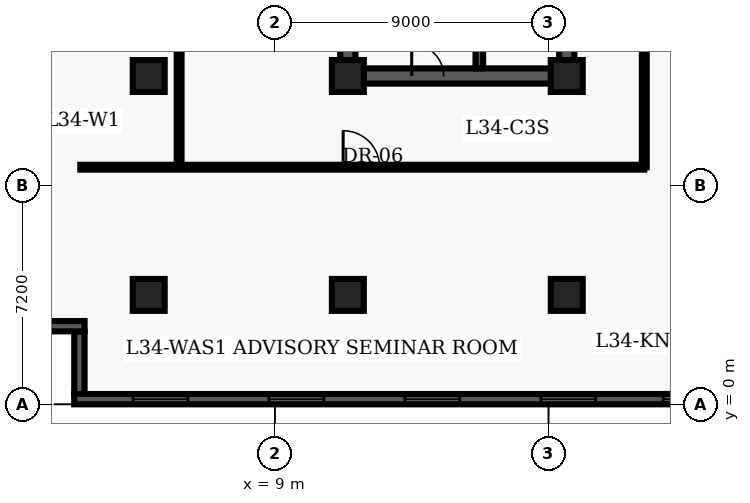
"""IFC4 building model, lengths in metres.
Left out: names, types, materials, properties, quantities, classifications, styles, units other than length and angle.
Written with IfcOpenShell. Run it as: python <this file> out.ifc"""

import sys

from ifc_helpers import new_model, entity, si_unit, converted_unit, direction, frame, origin_with_axes, origin_2d_with_axis, place, context, subcontext, project, spatial, polyline, rectangle, outline, extrude, element, fill, save


model = new_model("IFC4")
c1 = context("Model", 3, precision=1e-05, world=origin_with_axes(), true_north=direction((0.0, 1.0)))
c2 = subcontext(c1, "Body", "Model", "MODEL_VIEW")
j1 = project(units=[si_unit("LENGTHUNIT", "METRE"), converted_unit("PLANEANGLEUNIT", "DEGREE", entity("IfcPlaneAngleMeasure", 0.017), si_unit("PLANEANGLEUNIT", "RADIAN"), dimensions=[0, 0, 0, 0, 0, 0, 0])], contexts=[c1])
p1 = place(None, origin_with_axes())
s1 = spatial("IfcSite", under=j1, at=p1, CompositionType="ELEMENT")
p2 = place(p1, origin_with_axes())
s2 = spatial("IfcBuilding", under=s1, at=p2, CompositionType="ELEMENT")
p3 = place(p2, frame((0.0, 0.0, 140.7), z_axis=(0.0, 0.0, 1.0), x_axis=(1.0, 0.0, 0.0)))
s3 = spatial("IfcBuildingStorey", under=s2, at=p3, CompositionType="ELEMENT", Elevation=140.7)
p4 = place(p3, frame((11.4, 10.8, 0.0), z_axis=(0.0, 0.0, 1.0), x_axis=(0.0, 1.0, 0.0)))
e1 = element("IfcWall", 1, at=p4, inside=s3, PredefinedType="SHEAR", context=c2, shape_type="SweptSolid", body=[
    extrude(outline(polyline([(0.0, -0.25), (27.0, -0.25), (27.0, 0.25), (0.0, 0.25), (0.0, -0.25)])), origin_with_axes(), (0.0, 0.0, 1.0), 3.66),
])
p5 = place(p3, frame((11.4, 10.8, 0.0), z_axis=(0.0, 0.0, 1.0), x_axis=(1.0, 0.0, 0.0)))
e2 = element("IfcWall", 2, at=p5, inside=s3, PredefinedType="SHEAR", context=c2, shape_type="SweptSolid", body=[
    extrude(outline(polyline([(0.0, -0.25), (7.2, -0.25), (7.2, 0.25), (0.0, 0.25), (0.0, -0.25)])), origin_with_axes(), (0.0, 0.0, 1.0), 3.66),
])
p6 = place(p5, frame((2.625, 0.0, 0.0), z_axis=(0.0, 0.0, 1.0), x_axis=(1.0, 0.0, 0.0)))
e3 = element("IfcOpeningElement", 3, at=p6, cuts=e2, PredefinedType="OPENING", context=c2, shape_type="SweptSolid", body=[
    extrude(rectangle(XDim=1.05, YDim=0.52, at=origin_2d_with_axis()), origin_with_axes(), (0.0, 0.0, 1.0), 2.15),
])
p7 = place(p3, frame((18.6, 10.8, 0.0), z_axis=(0.0, 0.0, 1.0), x_axis=(0.0, 1.0, 0.0)))
e4 = element("IfcWall", 4, at=p7, inside=s3, PredefinedType="SHEAR", context=c2, shape_type="SweptSolid", body=[
    extrude(outline(polyline([(0.0, -0.25), (13.5, -0.25), (13.5, 0.25), (0.0, 0.25), (0.0, -0.25)])), origin_with_axes(), (0.0, 0.0, 1.0), 3.66),
])
p8 = place(p7, frame((11.125, 0.0, 0.0), z_axis=(0.0, 0.0, 1.0), x_axis=(1.0, 0.0, 0.0)))
e5 = element("IfcOpeningElement", 5, at=p8, cuts=e4, PredefinedType="OPENING", context=c2, shape_type="SweptSolid", body=[
    extrude(rectangle(XDim=1.05, YDim=0.52, at=origin_2d_with_axis()), origin_with_axes(), (0.0, 0.0, 1.0), 2.15),
])
p9 = place(p7, frame((2.425, 0.0, 0.0), z_axis=(0.0, 0.0, 1.0), x_axis=(1.0, 0.0, 0.0)))
e6 = element("IfcOpeningElement", 6, at=p9, cuts=e4, PredefinedType="OPENING", context=c2, shape_type="SweptSolid", body=[
    extrude(rectangle(XDim=1.05, YDim=0.52, at=origin_2d_with_axis()), origin_with_axes(), (0.0, 0.0, 1.0), 2.15),
])
p10 = place(p7, frame((6.725, 0.0, 0.0), z_axis=(0.0, 0.0, 1.0), x_axis=(1.0, 0.0, 0.0)))
e7 = element("IfcOpeningElement", 7, at=p10, cuts=e4, PredefinedType="OPENING", context=c2, shape_type="SweptSolid", body=[
    extrude(rectangle(XDim=1.05, YDim=0.52, at=origin_2d_with_axis()), origin_with_axes(), (0.0, 0.0, 1.0), 2.15),
])
p11 = place(p3, frame((15.725, 11.05, 0.0), z_axis=(0.0, 0.0, 1.0), x_axis=(0.0, 1.0, 0.0)))
e8 = element("IfcWall", 8, at=p11, inside=s3, PredefinedType="SHEAR", context=c2, shape_type="SweptSolid", body=[
    extrude(outline(polyline([(0.0, -0.125), (8.65, -0.125), (8.65, 0.125), (0.0, 0.125), (0.0, -0.125)])), origin_with_axes(), (0.0, 0.0, 1.0), 3.66),
])
for number, where, z_axis, x_axis in (
    (9, (11.4, 3.6, 0.0), (0.0, 0.0, 1.0), (1.0, 0.0, 0.0)),
    (10, (11.4, 10.8, 0.0), (0.0, 0.0, 1.0), (1.0, 0.0, 0.0)),
    (11, (18.6, 3.6, 0.0), (0.0, 0.0, 1.0), (1.0, 0.0, 0.0)),
    (12, (18.6, 10.8, 0.0), (0.0, 0.0, 1.0), (1.0, 0.0, 0.0)),
    (13, (4.85, 3.6, 0.0), (0.0, 0.0, 1.0), (1.0, 0.0, 0.0)),
    (14, (4.85, 10.8, 0.0), (0.0, 0.0, 1.0), (1.0, 0.0, 0.0)),
):
    element("IfcColumn", number, at=place(p3, frame(where, z_axis=z_axis, x_axis=x_axis)), inside=s3, PredefinedType="COLUMN", context=c2, shape_type="SweptSolid", body=[
        extrude(rectangle(XDim=1.05, YDim=1.05, at=origin_2d_with_axis()), origin_with_axes(), (0.0, 0.0, 1.0), 3.9),
    ])
p12 = place(p3, frame((2.6, 7.8, 0.0), z_axis=(0.0, 0.0, 1.0), x_axis=(1.0, 0.0, 0.0)))
e15 = element("IfcWall", 15, at=p12, inside=s3, PredefinedType="PARTITIONING", context=c2, shape_type="SweptSolid", body=[
    extrude(outline(polyline([(0.0, -0.08), (18.55, -0.08), (18.55, 0.08), (0.0, 0.08), (0.0, -0.08)])), origin_with_axes(), (0.0, 0.0, 1.0), 2.7),
])
p13 = place(p12, frame((9.245, 0.0, 0.0), z_axis=(0.0, 0.0, 1.0), x_axis=(1.0, 0.0, 0.0)))
e16 = element("IfcOpeningElement", 16, at=p13, cuts=e15, PredefinedType="OPENING", context=c2, shape_type="SweptSolid", body=[
    extrude(rectangle(XDim=1.2, YDim=0.18, at=origin_2d_with_axis()), origin_with_axes(), (0.0, 0.0, 1.0), 2.2),
])
p14 = place(p3, frame((21.15, 7.8, 0.0), z_axis=(0.0, 0.0, 1.0), x_axis=(0.0, 1.0, 0.0)))
e17 = element("IfcWall", 17, at=p14, inside=s3, PredefinedType="PARTITIONING", context=c2, shape_type="SweptSolid", body=[
    extrude(outline(polyline([(0.0, -0.08), (32.7, -0.08), (32.7, 0.08), (0.0, 0.08), (0.0, -0.08)])), origin_with_axes(), (0.0, 0.0, 1.0), 2.7),
])
p15 = place(p14, frame((5.475, 0.0, 0.0), z_axis=(0.0, 0.0, 1.0), x_axis=(1.0, 0.0, 0.0)))
e18 = element("IfcOpeningElement", 18, at=p15, cuts=e17, PredefinedType="OPENING", context=c2, shape_type="SweptSolid", body=[
    extrude(rectangle(XDim=1.05, YDim=0.18, at=origin_2d_with_axis()), origin_with_axes(), (0.0, 0.0, 1.0), 2.15),
])
p16 = place(p3, frame((5.85, 7.8, 0.0), z_axis=(0.0, 0.0, 1.0), x_axis=(0.0, 1.0, 0.0)))
e19 = element("IfcWall", 19, at=p16, inside=s3, PredefinedType="PARTITIONING", context=c2, shape_type="SweptSolid", body=[
    extrude(outline(polyline([(0.0, -0.08), (32.7, -0.08), (32.7, 0.08), (0.0, 0.08), (0.0, -0.08)])), origin_with_axes(), (0.0, 0.0, 1.0), 2.7),
])
p17 = place(p16, frame((7.056, 0.0, 0.0), z_axis=(0.0, 0.0, 1.0), x_axis=(1.0, 0.0, 0.0)))
e20 = element("IfcOpeningElement", 20, at=p17, cuts=e19, PredefinedType="OPENING", context=c2, shape_type="SweptSolid", body=[
    extrude(rectangle(XDim=1.0, YDim=0.18, at=origin_2d_with_axis()), origin_with_axes(), (0.0, 0.0, 1.0), 2.15),
])
p18 = place(p16, frame((23.276, 0.0, 0.0), z_axis=(0.0, 0.0, 1.0), x_axis=(1.0, 0.0, 0.0)))
e21 = element("IfcOpeningElement", 21, at=p18, cuts=e19, PredefinedType="OPENING", context=c2, shape_type="SweptSolid", body=[
    extrude(rectangle(XDim=1.0, YDim=0.18, at=origin_2d_with_axis()), origin_with_axes(), (0.0, 0.0, 1.0), 2.15),
])
p19 = place(p3, frame((57.26, 0.17, 0.0), z_axis=(0.0, 0.0, 1.0), x_axis=(-1.0, 0.0, 0.0)))
e22 = element("IfcWall", 22, at=p19, inside=s3, PredefinedType="SOLIDWALL", context=c2, shape_type="SweptSolid", body=[
    extrude(outline(polyline([(0.0, -0.17), (54.86, -0.17), (54.86, 0.17), (0.0, 0.17), (0.0, -0.17)])), origin_with_axes(), (0.0, 0.0, 1.0), 3.66),
])
p20 = place(p19, frame((2.836, 0.0, 0.45), z_axis=(0.0, 0.0, 1.0), x_axis=(1.0, 0.0, 0.0)))
e23 = element("IfcOpeningElement", 23, at=p20, cuts=e22, PredefinedType="OPENING", context=c2, shape_type="SweptSolid", body=[
    extrude(rectangle(XDim=1.8, YDim=0.36, at=origin_2d_with_axis()), origin_with_axes(), (0.0, 0.0, 1.0), 2.1),
])
p21 = place(p19, frame((7.307, 0.0, 0.45), z_axis=(0.0, 0.0, 1.0), x_axis=(1.0, 0.0, 0.0)))
e24 = element("IfcOpeningElement", 24, at=p21, cuts=e22, PredefinedType="OPENING", context=c2, shape_type="SweptSolid", body=[
    extrude(rectangle(XDim=1.8, YDim=0.36, at=origin_2d_with_axis()), origin_with_axes(), (0.0, 0.0, 1.0), 2.1),
])
p22 = place(p19, frame((11.779, 0.0, 0.45), z_axis=(0.0, 0.0, 1.0), x_axis=(1.0, 0.0, 0.0)))
e25 = element("IfcOpeningElement", 25, at=p22, cuts=e22, PredefinedType="OPENING", context=c2, shape_type="SweptSolid", body=[
    extrude(rectangle(XDim=1.8, YDim=0.36, at=origin_2d_with_axis()), origin_with_axes(), (0.0, 0.0, 1.0), 2.1),
])
p23 = place(p19, frame((16.251, 0.0, 0.45), z_axis=(0.0, 0.0, 1.0), x_axis=(1.0, 0.0, 0.0)))
e26 = element("IfcOpeningElement", 26, at=p23, cuts=e22, PredefinedType="OPENING", context=c2, shape_type="SweptSolid", body=[
    extrude(rectangle(XDim=1.8, YDim=0.36, at=origin_2d_with_axis()), origin_with_axes(), (0.0, 0.0, 1.0), 2.1),
])
p24 = place(p19, frame((20.723, 0.0, 0.45), z_axis=(0.0, 0.0, 1.0), x_axis=(1.0, 0.0, 0.0)))
e27 = element("IfcOpeningElement", 27, at=p24, cuts=e22, PredefinedType="OPENING", context=c2, shape_type="SweptSolid", body=[
    extrude(rectangle(XDim=1.8, YDim=0.36, at=origin_2d_with_axis()), origin_with_axes(), (0.0, 0.0, 1.0), 2.1),
])
p25 = place(p19, frame((34.588, 0.0, 0.45), z_axis=(0.0, 0.0, 1.0), x_axis=(1.0, 0.0, 0.0)))
e28 = element("IfcOpeningElement", 28, at=p25, cuts=e22, PredefinedType="OPENING", context=c2, shape_type="SweptSolid", body=[
    extrude(rectangle(XDim=1.8, YDim=0.36, at=origin_2d_with_axis()), origin_with_axes(), (0.0, 0.0, 1.0), 2.1),
])
p26 = place(p19, frame((38.609, 0.0, 0.45), z_axis=(0.0, 0.0, 1.0), x_axis=(1.0, 0.0, 0.0)))
e29 = element("IfcOpeningElement", 29, at=p26, cuts=e22, PredefinedType="OPENING", context=c2, shape_type="SweptSolid", body=[
    extrude(rectangle(XDim=1.8, YDim=0.36, at=origin_2d_with_axis()), origin_with_axes(), (0.0, 0.0, 1.0), 2.1),
])
p27 = place(p19, frame((43.081, 0.0, 0.45), z_axis=(0.0, 0.0, 1.0), x_axis=(1.0, 0.0, 0.0)))
e30 = element("IfcOpeningElement", 30, at=p27, cuts=e22, PredefinedType="OPENING", context=c2, shape_type="SweptSolid", body=[
    extrude(rectangle(XDim=1.8, YDim=0.36, at=origin_2d_with_axis()), origin_with_axes(), (0.0, 0.0, 1.0), 2.1),
])
p28 = place(p19, frame((47.553, 0.0, 0.45), z_axis=(0.0, 0.0, 1.0), x_axis=(1.0, 0.0, 0.0)))
e31 = element("IfcOpeningElement", 31, at=p28, cuts=e22, PredefinedType="OPENING", context=c2, shape_type="SweptSolid", body=[
    extrude(rectangle(XDim=1.8, YDim=0.36, at=origin_2d_with_axis()), origin_with_axes(), (0.0, 0.0, 1.0), 2.1),
])
p29 = place(p19, frame((52.024, 0.0, 0.45), z_axis=(0.0, 0.0, 1.0), x_axis=(1.0, 0.0, 0.0)))
e32 = element("IfcOpeningElement", 32, at=p29, cuts=e22, PredefinedType="OPENING", context=c2, shape_type="SweptSolid", body=[
    extrude(rectangle(XDim=1.8, YDim=0.36, at=origin_2d_with_axis()), origin_with_axes(), (0.0, 0.0, 1.0), 2.1),
])
p30 = place(p3, frame((2.57, 0.34, 0.0), z_axis=(0.0, 0.0, 1.0), x_axis=(0.0, 1.0, 0.0)))
e33 = element("IfcWall", 33, at=p30, inside=s3, PredefinedType="SOLIDWALL", context=c2, shape_type="SweptSolid", body=[
    extrude(outline(polyline([(0.0, -0.17), (2.06, -0.17), (2.06, 0.17), (0.0, 0.17), (0.0, -0.17)])), origin_with_axes(), (0.0, 0.0, 1.0), 3.66),
])
p31 = place(p3, frame((2.74, 2.57, 0.0), z_axis=(0.0, 0.0, 1.0), x_axis=(-1.0, 0.0, 0.0)))
e34 = element("IfcWall", 34, at=p31, inside=s3, PredefinedType="SOLIDWALL", context=c2, shape_type="SweptSolid", body=[
    extrude(outline(polyline([(0.0, -0.17), (2.74, -0.17), (2.74, 0.17), (0.0, 0.17), (0.0, -0.17)])), origin_with_axes(), (0.0, 0.0, 1.0), 3.66),
])
p32 = place(p5, frame((2.625, 0.0, 0.0), z_axis=(0.0, 0.0, 1.0), x_axis=(1.0, 0.0, 0.0)))
e35 = element("IfcDoor", 35, at=p32, inside=s3, OperationType="SINGLE_SWING_LEFT", PredefinedType="DOOR", context=c2, shape_type="SweptSolid", body=[
    extrude(rectangle(XDim=1.05, YDim=0.09, at=origin_2d_with_axis()), origin_with_axes(), (0.0, 0.0, 1.0), 2.15),
])
fill(e3, e35)
p33 = place(p12, frame((9.245, 0.0, 0.0), z_axis=(0.0, 0.0, 1.0), x_axis=(1.0, 0.0, 0.0)))
e36 = element("IfcDoor", 36, at=p33, inside=s3, OperationType="SINGLE_SWING_LEFT", PredefinedType="DOOR", context=c2, shape_type="SweptSolid", body=[
    extrude(rectangle(XDim=1.2, YDim=0.09, at=origin_2d_with_axis()), origin_with_axes(), (0.0, 0.0, 1.0), 2.2),
])
fill(e16, e36)
p34 = place(p19, frame((34.588, 0.0, 0.45), z_axis=(0.0, 0.0, 1.0), x_axis=(1.0, 0.0, 0.0)))
e37 = element("IfcWindow", 37, at=p34, inside=s3, PredefinedType="WINDOW", context=c2, shape_type="SweptSolid", body=[
    extrude(rectangle(XDim=1.8, YDim=0.09, at=origin_2d_with_axis()), origin_with_axes(), (0.0, 0.0, 1.0), 2.1),
])
fill(e28, e37)
p35 = place(p19, frame((38.609, 0.0, 0.45), z_axis=(0.0, 0.0, 1.0), x_axis=(1.0, 0.0, 0.0)))
e38 = element("IfcWindow", 38, at=p35, inside=s3, PredefinedType="WINDOW", context=c2, shape_type="SweptSolid", body=[
    extrude(rectangle(XDim=1.8, YDim=0.09, at=origin_2d_with_axis()), origin_with_axes(), (0.0, 0.0, 1.0), 2.1),
])
fill(e29, e38)
p36 = place(p19, frame((43.081, 0.0, 0.45), z_axis=(0.0, 0.0, 1.0), x_axis=(1.0, 0.0, 0.0)))
e39 = element("IfcWindow", 39, at=p36, inside=s3, PredefinedType="WINDOW", context=c2, shape_type="SweptSolid", body=[
    extrude(rectangle(XDim=1.8, YDim=0.09, at=origin_2d_with_axis()), origin_with_axes(), (0.0, 0.0, 1.0), 2.1),
])
fill(e30, e39)
p37 = place(p19, frame((47.553, 0.0, 0.45), z_axis=(0.0, 0.0, 1.0), x_axis=(1.0, 0.0, 0.0)))
e40 = element("IfcWindow", 40, at=p37, inside=s3, PredefinedType="WINDOW", context=c2, shape_type="SweptSolid", body=[
    extrude(rectangle(XDim=1.8, YDim=0.09, at=origin_2d_with_axis()), origin_with_axes(), (0.0, 0.0, 1.0), 2.1),
])
fill(e31, e40)
p38 = place(p19, frame((52.024, 0.0, 0.45), z_axis=(0.0, 0.0, 1.0), x_axis=(1.0, 0.0, 0.0)))
e41 = element("IfcWindow", 41, at=p38, inside=s3, PredefinedType="WINDOW", context=c2, shape_type="SweptSolid", body=[
    extrude(rectangle(XDim=1.8, YDim=0.09, at=origin_2d_with_axis()), origin_with_axes(), (0.0, 0.0, 1.0), 2.1),
])
fill(e32, e41)
save(model, sys.argv[1])
